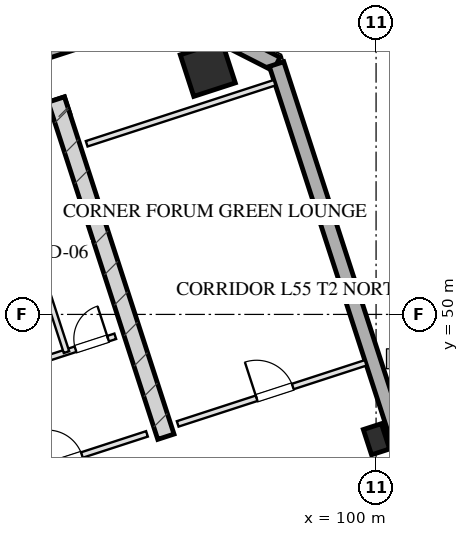
"""IFC4 building model, lengths in metres.
Left out: names, types, materials, properties, quantities, classifications, styles, units other than length and angle.
Written with IfcOpenShell. Run it as: python <this file> out.ifc"""

import sys

from ifc_helpers import new_model, si_unit, direction, frame, frame_2d, origin, origin_2d, place, context, subcontext, project, spatial, rectangle, hollow_rectangle, extrude, element, fill, save


model = new_model("IFC4")
c1 = context("Model", 3, precision=1e-05, world=origin(), true_north=direction((0.0, 1.0)))
c2 = subcontext(c1, "Body", "Model", "MODEL_VIEW")
j1 = project(units=[si_unit("LENGTHUNIT", "METRE"), si_unit("PLANEANGLEUNIT", "RADIAN")], contexts=[c1])
p1 = place(None, origin())
s1 = spatial("IfcSite", under=j1, at=p1, CompositionType="ELEMENT")
p2 = place(p1, origin())
s2 = spatial("IfcBuilding", under=s1, at=p2, CompositionType="ELEMENT")
p3 = place(p2, frame((0.0, 0.0, 205.85)))
s3 = spatial("IfcBuildingStorey", under=s2, at=p3, CompositionType="ELEMENT", Elevation=205.85)
p4 = place(p3, frame((76.415, 50.489, 0.0), z_axis=(0.0, 0.0, 1.0), x_axis=(0.951056810414, 0.309016089169, 0.0)))
e1 = element("IfcWall", 1, at=p4, inside=s3, PredefinedType="SHEAR", context=c2, shape_type="SweptSolid", body=[
    extrude(rectangle(XDim=16.25, YDim=0.45, at=frame_2d((8.125, 0.0))), origin(), (0.0, 0.0, 1.0), 3.45),
])
p5 = place(p3, frame((94.469, 46.781, 0.0), z_axis=(0.0, 0.0, 1.0), x_axis=(-0.309004419953, 0.951060601881, 0.0)))
e2 = element("IfcWall", 2, at=p5, inside=s3, PredefinedType="SHEAR", context=c2, shape_type="SweptSolid", body=[
    extrude(rectangle(XDim=9.33, YDim=0.45, at=frame_2d((4.665, 0.0))), origin(), (0.0, 0.0, 1.0), 3.45),
])
p6 = place(p3, frame((95.572, 56.461, 0.0), z_axis=(0.0, 0.0, 1.0), x_axis=(0.951056516295, 0.309016994375, 0.0)))
e3 = element("IfcColumn", 3, at=p6, inside=s3, PredefinedType="COLUMN", context=c2, shape_type="SweptSolid", body=[
    extrude(hollow_rectangle(XDim=1.15, YDim=1.15, WallThickness=0.04, at=origin_2d()), origin(), (0.0, 0.0, 1.0), 3.451),
])
p7 = place(p3, frame((100.01, 46.716, 0.0), z_axis=(0.0, 0.0, 1.0), x_axis=(0.951056516295, 0.309016994375, 0.0)))
e4 = element("IfcColumn", 4, at=p7, inside=s3, PredefinedType="COLUMN", context=c2, shape_type="SweptSolid", body=[
    extrude(hollow_rectangle(XDim=0.5, YDim=0.7, WallThickness=0.025, at=origin_2d()), origin(), (0.0, 0.0, 1.0), 3.451),
])
p8 = place(p3, frame((72.165, 50.706, 0.0), z_axis=(0.0, 0.0, 1.0), x_axis=(0.951058012937, 0.309012388148, 0.0)))
e5 = element("IfcWall", 5, at=p8, inside=s3, PredefinedType="SOLIDWALL", context=c2, shape_type="SweptSolid", body=[
    extrude(rectangle(XDim=23.6, YDim=0.4, at=frame_2d((11.8, 0.0))), origin(), (0.0, 0.0, 1.0), 2.61),
])
p9 = place(p3, frame((94.61, 57.999, 0.0), z_axis=(0.0, 0.0, 1.0), x_axis=(0.890979603174, -0.454043331334, 0.0)))
e6 = element("IfcWall", 6, at=p9, inside=s3, PredefinedType="SOLIDWALL", context=c2, shape_type="SweptSolid", body=[
    extrude(rectangle(XDim=3.111, YDim=0.4, at=frame_2d((1.556, 0.0))), origin(), (0.0, 0.0, 1.0), 2.61),
])
p10 = place(p3, frame((97.382, 56.586, 0.0), z_axis=(0.0, 0.0, 1.0), x_axis=(0.309016491071, -0.951056679828, 0.0)))
e7 = element("IfcWall", 7, at=p10, inside=s3, PredefinedType="SOLIDWALL", context=c2, shape_type="SweptSolid", body=[
    extrude(rectangle(XDim=38.4, YDim=0.4, at=frame_2d((19.2, 0.0))), origin(), (0.0, 0.0, 1.0), 2.61),
])
p11 = place(p10, frame((24.55, 0.0, 0.75)))
e8 = element("IfcOpeningElement", 8, at=p11, cuts=e7, PredefinedType="OPENING", context=c2, shape_type="SweptSolid", body=[
    extrude(rectangle(XDim=2.1, YDim=1.46, at=frame_2d((1.05, 0.73))), frame((0.0, 0.21, 0.0), z_axis=(0.0, -1.0, 0.0), x_axis=(1.0, 0.0, 0.0)), (0.0, 0.0, 1.0), 0.42),
])
p12 = place(p10, frame((20.75, 0.0, 0.75)))
e9 = element("IfcOpeningElement", 9, at=p12, cuts=e7, PredefinedType="OPENING", context=c2, shape_type="SweptSolid", body=[
    extrude(rectangle(XDim=2.1, YDim=1.46, at=frame_2d((1.05, 0.73))), frame((0.0, 0.21, 0.0), z_axis=(0.0, -1.0, 0.0), x_axis=(1.0, 0.0, 0.0)), (0.0, 0.0, 1.0), 0.42),
])
p13 = place(p10, frame((16.05, 0.0, 0.0)))
e10 = element("IfcOpeningElement", 10, at=p13, cuts=e7, PredefinedType="OPENING", context=c2, shape_type="SweptSolid", body=[
    extrude(rectangle(XDim=1.1, YDim=2.15, at=frame_2d((0.55, 1.075))), frame((0.0, 0.21, 0.0), z_axis=(0.0, -1.0, 0.0), x_axis=(1.0, 0.0, 0.0)), (0.0, 0.0, 1.0), 0.42),
])
p14 = place(p3, frame((90.928, 45.868, 0.0), z_axis=(0.0, 0.0, 1.0), x_axis=(0.951059297078, 0.309008435874, 0.0)))
e11 = element("IfcWall", 11, at=p14, inside=s3, PredefinedType="PARTITIONING", context=c2, shape_type="SweptSolid", body=[
    extrude(rectangle(XDim=3.2, YDim=0.15, at=frame_2d((1.6, 0.0))), origin(), (0.0, 0.0, 1.0), 3.175),
])
p15 = place(p14, frame((0.45, 0.0, 0.0)))
e12 = element("IfcOpeningElement", 12, at=p15, cuts=e11, PredefinedType="OPENING", context=c2, shape_type="SweptSolid", body=[
    extrude(rectangle(XDim=0.95, YDim=2.05, at=frame_2d((0.475, 1.025))), frame((0.0, 0.085, 0.0), z_axis=(0.0, -1.0, 0.0), x_axis=(1.0, 0.0, 0.0)), (0.0, 0.0, 1.0), 0.17),
])
p16 = place(p3, frame((90.094, 48.436, 0.0), z_axis=(0.0, 0.0, 1.0), x_axis=(0.951066581729, 0.308986014439, 0.0)))
e13 = element("IfcWall", 13, at=p16, inside=s3, PredefinedType="PARTITIONING", context=c2, shape_type="SweptSolid", body=[
    extrude(rectangle(XDim=3.2, YDim=0.15, at=frame_2d((1.6, 0.0))), origin(), (0.0, 0.0, 1.0), 3.175),
])
p17 = place(p16, frame((0.35, 0.0, 0.0)))
e14 = element("IfcOpeningElement", 14, at=p17, cuts=e13, PredefinedType="OPENING", context=c2, shape_type="SweptSolid", body=[
    extrude(rectangle(XDim=0.9, YDim=2.05, at=frame_2d((0.45, 1.025))), frame((0.0, 0.085, 0.0), z_axis=(0.0, -1.0, 0.0), x_axis=(1.0, 0.0, 0.0)), (0.0, 0.0, 1.0), 0.17),
])
p18 = place(p16, frame((2.1, 0.0, 0.0)))
e15 = element("IfcOpeningElement", 15, at=p18, cuts=e13, PredefinedType="OPENING", context=c2, shape_type="SweptSolid", body=[
    extrude(rectangle(XDim=0.9, YDim=2.05, at=frame_2d((0.45, 1.025))), frame((0.0, 0.085, 0.0), z_axis=(0.0, -1.0, 0.0), x_axis=(1.0, 0.0, 0.0)), (0.0, 0.0, 1.0), 0.17),
])
p19 = place(p3, frame((91.853, 49.007, 0.0), z_axis=(0.0, 0.0, 1.0), x_axis=(-0.309022487551, 0.951054731437, 0.0)))
e16 = element("IfcWall", 16, at=p19, inside=s3, PredefinedType="PARTITIONING", context=c2, shape_type="SweptSolid", body=[
    extrude(rectangle(XDim=5.73, YDim=0.15, at=frame_2d((2.865, 0.0))), origin(), (0.0, 0.0, 1.0), 3.175),
])
p20 = place(p3, frame((92.385, 54.49, 0.0), z_axis=(0.0, 0.0, 1.0), x_axis=(0.951055112834, 0.309021313752, 0.0)))
e17 = element("IfcWall", 17, at=p20, inside=s3, PredefinedType="PARTITIONING", context=c2, shape_type="SweptSolid", body=[
    extrude(rectangle(XDim=5.2, YDim=0.15, at=frame_2d((2.6, 0.0))), origin(), (0.0, 0.0, 1.0), 3.175),
])
p21 = place(p3, frame((94.78, 47.119, 0.0), z_axis=(0.0, 0.0, 1.0), x_axis=(0.951055112834, 0.309021313752, 0.0)))
e18 = element("IfcWall", 18, at=p21, inside=s3, PredefinedType="PARTITIONING", context=c2, shape_type="SweptSolid", body=[
    extrude(rectangle(XDim=5.2, YDim=0.15, at=frame_2d((2.6, 0.0))), origin(), (0.0, 0.0, 1.0), 3.175),
])
p22 = place(p21, frame((2.184, 0.0, 0.0)))
e19 = element("IfcOpeningElement", 19, at=p22, cuts=e18, PredefinedType="OPENING", context=c2, shape_type="SweptSolid", body=[
    extrude(rectangle(XDim=1.0, YDim=2.05, at=frame_2d((0.5, 1.025))), frame((0.0, 0.085, 0.0), z_axis=(0.0, -1.0, 0.0), x_axis=(1.0, 0.0, 0.0)), (0.0, 0.0, 1.0), 0.17),
])
p23 = place(p3, frame((96.654, 44.91, 0.0), z_axis=(0.0, 0.0, 1.0), x_axis=(0.951044133184, 0.309055103076, 0.0)))
e20 = element("IfcWall", 20, at=p23, inside=s3, PredefinedType="PARTITIONING", context=c2, shape_type="SweptSolid", body=[
    extrude(rectangle(XDim=4.1, YDim=0.15, at=frame_2d((2.05, 0.0))), origin(), (0.0, 0.0, 1.0), 3.175),
])
p24 = place(p15, origin())
e21 = element("IfcDoor", 21, at=p24, inside=s3, OperationType="SINGLE_SWING_LEFT", PredefinedType="DOOR", context=c2, shape_type="SweptSolid", body=[
    extrude(rectangle(XDim=0.95, YDim=2.05, at=frame_2d((0.475, 1.025))), frame((0.0, 0.025, 0.0), z_axis=(0.0, -1.0, 0.0), x_axis=(1.0, 0.0, 0.0)), (0.0, 0.0, 1.0), 0.05),
])
fill(e12, e21)
p25 = place(p18, origin())
e22 = element("IfcDoor", 22, at=p25, inside=s3, OperationType="SINGLE_SWING_RIGHT", PredefinedType="DOOR", context=c2, shape_type="SweptSolid", body=[
    extrude(rectangle(XDim=0.9, YDim=2.05, at=frame_2d((0.45, 1.025))), frame((0.0, 0.025, 0.0), z_axis=(0.0, -1.0, 0.0), x_axis=(1.0, 0.0, 0.0)), (0.0, 0.0, 1.0), 0.05),
])
fill(e15, e22)
p26 = place(p22, origin())
e23 = element("IfcDoor", 23, at=p26, inside=s3, OperationType="SINGLE_SWING_LEFT", PredefinedType="DOOR", context=c2, shape_type="SweptSolid", body=[
    extrude(rectangle(XDim=1.0, YDim=2.05, at=frame_2d((0.5, 1.025))), frame((0.0, 0.025, 0.0), z_axis=(0.0, -1.0, 0.0), x_axis=(1.0, 0.0, 0.0)), (0.0, 0.0, 1.0), 0.05),
])
fill(e19, e23)
save(model, sys.argv[1])
